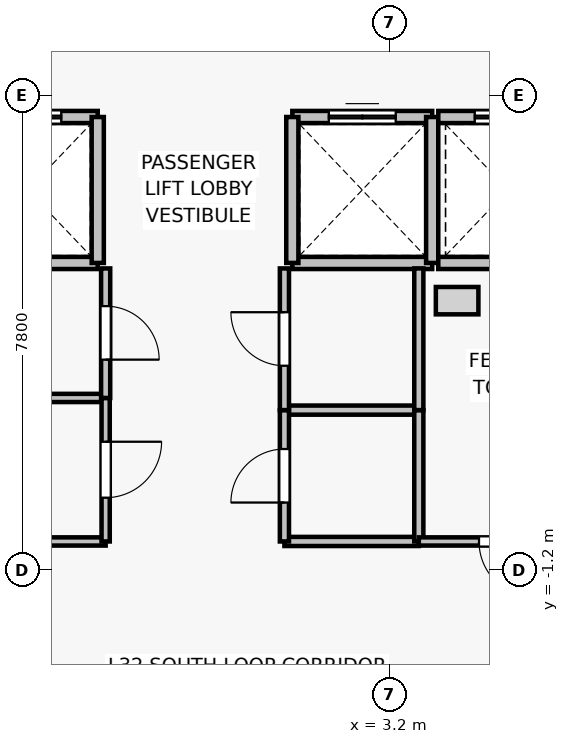
"""IFC4 building model, lengths in metres.
Left out: names, types, materials, properties, quantities, classifications, styles, units other than length and angle.
Written with IfcOpenShell. Run it as: python <this file> out.ifc"""

import sys

from ifc_helpers import new_model, si_unit, direction, frame, frame_2d, origin, place, context, subcontext, project, spatial, rectangle, extrude, source, transform, mapped, element, fill, save


model = new_model("IFC4")
c1 = context("Model", 3, precision=1e-05, world=origin(), true_north=direction((0.0, 1.0)))
c2 = subcontext(c1, "Body", "Model", "MODEL_VIEW")
j1 = project(units=[si_unit("LENGTHUNIT", "METRE"), si_unit("PLANEANGLEUNIT", "RADIAN")], contexts=[c1])
p1 = place(None, origin())
s1 = spatial("IfcSite", under=j1, at=p1, CompositionType="ELEMENT")
p2 = place(p1, origin())
s2 = spatial("IfcBuilding", under=s1, at=p2, CompositionType="ELEMENT")
p3 = place(p2, frame((0.0, 0.0, 116.5)))
s3 = spatial("IfcBuildingStorey", under=s2, at=p3, CompositionType="ELEMENT", Elevation=116.5)
p4 = place(p3, frame((-1.6, 3.85, 0.0), z_axis=(0.0, 0.0, 1.0), x_axis=(-1.0, 0.0, 0.0)))
e1 = element("IfcWall", 1, at=p4, inside=s3, PredefinedType="SOLIDWALL", context=c2, shape_type="SweptSolid", body=[
    extrude(rectangle(XDim=2.3, YDim=0.2, at=frame_2d((1.15, 0.0))), origin(), (0.0, 0.0, 1.0), 3.075),
])
p5 = place(p3, frame((-3.9, 6.25, 0.0), z_axis=(0.0, 0.0, 1.0), x_axis=(1.0, 0.0, 0.0)))
e2 = element("IfcWall", 2, at=p5, inside=s3, PredefinedType="SOLIDWALL", context=c2, shape_type="SweptSolid", body=[
    extrude(rectangle(XDim=2.3, YDim=0.2, at=frame_2d((1.15, 0.0))), origin(), (0.0, 0.0, 1.0), 3.075),
])
p6 = place(p5, frame((0.6, 0.0, 0.0)))
e3 = element("IfcOpeningElement", 3, at=p6, cuts=e2, PredefinedType="OPENING", context=c2, shape_type="SweptSolid", body=[
    extrude(rectangle(XDim=1.1, YDim=2.2, at=frame_2d((0.55, 1.1))), frame((0.0, 0.11, 0.0), z_axis=(0.0, -1.0, 0.0), x_axis=(1.0, 0.0, 0.0)), (0.0, 0.0, 1.0), 0.22),
])
p7 = place(p3, frame((-1.6, 6.25, 0.0), z_axis=(0.0, 0.0, 1.0), x_axis=(0.0, -1.0, 0.0)))
e4 = element("IfcWall", 4, at=p7, inside=s3, PredefinedType="SOLIDWALL", context=c2, shape_type="SweptSolid", body=[
    extrude(rectangle(XDim=2.4, YDim=0.2, at=frame_2d((1.2, 0.0))), origin(), (0.0, 0.0, 1.0), 3.075),
])
p8 = place(p3, frame((3.9, 3.85, 0.0), z_axis=(0.0, 0.0, 1.0), x_axis=(-1.0, 0.0, 0.0)))
e5 = element("IfcWall", 5, at=p8, inside=s3, PredefinedType="SOLIDWALL", context=c2, shape_type="SweptSolid", body=[
    extrude(rectangle(XDim=2.3, YDim=0.2, at=frame_2d((1.15, 0.0))), origin(), (0.0, 0.0, 1.0), 3.075),
])
p9 = place(p3, frame((1.6, 6.25, 0.0), z_axis=(0.0, 0.0, 1.0), x_axis=(1.0, 0.0, 0.0)))
e6 = element("IfcWall", 6, at=p9, inside=s3, PredefinedType="SOLIDWALL", context=c2, shape_type="SweptSolid", body=[
    extrude(rectangle(XDim=2.3, YDim=0.2, at=frame_2d((1.15, 0.0))), origin(), (0.0, 0.0, 1.0), 3.075),
])
p10 = place(p9, frame((0.6, 0.0, 0.0)))
e7 = element("IfcOpeningElement", 7, at=p10, cuts=e6, PredefinedType="OPENING", context=c2, shape_type="SweptSolid", body=[
    extrude(rectangle(XDim=1.1, YDim=2.2, at=frame_2d((0.55, 1.1))), frame((0.0, 0.11, 0.0), z_axis=(0.0, -1.0, 0.0), x_axis=(1.0, 0.0, 0.0)), (0.0, 0.0, 1.0), 0.22),
])
for number, where, z_axis, x_axis in (
    (8, (1.6, 3.85, 0.0), (0.0, 0.0, 1.0), (0.0, 1.0, 0.0)),
    (9, (3.9, 6.25, 0.0), (0.0, 0.0, 1.0), (0.0, -1.0, 0.0)),
):
    element("IfcWall", number, at=place(p3, frame(where, z_axis=z_axis, x_axis=x_axis)), inside=s3, PredefinedType="SOLIDWALL", context=c2, shape_type="SweptSolid", body=[
        extrude(rectangle(XDim=2.4, YDim=0.2, at=frame_2d((1.2, 0.0))), origin(), (0.0, 0.0, 1.0), 3.075),
    ])
p11 = place(p3, frame((6.3, 3.85, 0.0), z_axis=(0.0, 0.0, 1.0), x_axis=(-1.0, 0.0, 0.0)))
e10 = element("IfcWall", 10, at=p11, inside=s3, PredefinedType="SOLIDWALL", context=c2, shape_type="SweptSolid", body=[
    extrude(rectangle(XDim=2.3, YDim=0.2, at=frame_2d((1.15, 0.0))), origin(), (0.0, 0.0, 1.0), 3.075),
])
p12 = place(p3, frame((4.0, 6.25, 0.0), z_axis=(0.0, 0.0, 1.0), x_axis=(1.0, 0.0, 0.0)))
e11 = element("IfcWall", 11, at=p12, inside=s3, PredefinedType="SOLIDWALL", context=c2, shape_type="SweptSolid", body=[
    extrude(rectangle(XDim=2.3, YDim=0.2, at=frame_2d((1.15, 0.0))), origin(), (0.0, 0.0, 1.0), 3.075),
])
p13 = place(p12, frame((0.6, 0.0, 0.0)))
e12 = element("IfcOpeningElement", 12, at=p13, cuts=e11, PredefinedType="OPENING", context=c2, shape_type="SweptSolid", body=[
    extrude(rectangle(XDim=1.1, YDim=2.2, at=frame_2d((0.55, 1.1))), frame((0.0, 0.11, 0.0), z_axis=(0.0, -1.0, 0.0), x_axis=(1.0, 0.0, 0.0)), (0.0, 0.0, 1.0), 0.22),
])
for number, where, z_axis, x_axis in (
    (13, (-1.47, -0.73, 0.0), (0.0, 0.0, 1.0), (-1.0, 0.0, 0.0)),
    (14, (-3.47, 1.63, 0.0), (0.0, 0.0, 1.0), (1.0, 0.0, 0.0)),
):
    element("IfcWall", number, at=place(p3, frame(where, z_axis=z_axis, x_axis=x_axis)), inside=s3, PredefinedType="PARTITIONING", context=c2, shape_type="SweptSolid", body=[
        extrude(rectangle(XDim=2.0, YDim=0.135, at=frame_2d((1.0, 0.0))), origin(), (0.0, 0.0, 1.0), 3.075),
    ])
p14 = place(p3, frame((-1.47, 1.63, 0.0), z_axis=(0.0, 0.0, 1.0), x_axis=(0.0, -1.0, 0.0)))
e15 = element("IfcWall", 15, at=p14, inside=s3, PredefinedType="PARTITIONING", context=c2, shape_type="SweptSolid", body=[
    extrude(rectangle(XDim=2.36, YDim=0.135, at=frame_2d((1.18, 0.0))), origin(), (0.0, 0.0, 1.0), 3.075),
])
p15 = place(p14, frame((0.72, 0.0, 0.0)))
e16 = element("IfcOpeningElement", 16, at=p15, cuts=e15, PredefinedType="OPENING", context=c2, shape_type="SweptSolid", body=[
    extrude(rectangle(XDim=0.92, YDim=2.1, at=frame_2d((0.46, 1.05))), frame((0.0, 0.077, 0.0), z_axis=(0.0, -1.0, 0.0), x_axis=(1.0, 0.0, 0.0)), (0.0, 0.0, 1.0), 0.155),
])
p16 = place(p3, frame((-1.47, 3.76, 0.0), z_axis=(0.0, 0.0, 1.0), x_axis=(0.0, -1.0, 0.0)))
e17 = element("IfcWall", 17, at=p16, inside=s3, PredefinedType="PARTITIONING", context=c2, shape_type="SweptSolid", body=[
    extrude(rectangle(XDim=2.13, YDim=0.15, at=frame_2d((1.065, 0.0))), origin(), (0.0, 0.0, 1.0), 3.075),
])
p17 = place(p16, frame((0.62, 0.0, 0.0)))
e18 = element("IfcOpeningElement", 18, at=p17, cuts=e17, PredefinedType="OPENING", context=c2, shape_type="SweptSolid", body=[
    extrude(rectangle(XDim=0.88, YDim=2.1, at=frame_2d((0.44, 1.05))), frame((0.0, 0.085, 0.0), z_axis=(0.0, -1.0, 0.0), x_axis=(1.0, 0.0, 0.0)), (0.0, 0.0, 1.0), 0.17),
])
for number, where, z_axis, x_axis in (
    (19, (3.68, -0.73, 0.0), (0.0, 0.0, 1.0), (-1.0, 0.0, 0.0)),
    (20, (1.47, 1.43, 0.0), (0.0, 0.0, 1.0), (1.0, 0.0, 0.0)),
):
    element("IfcWall", number, at=place(p3, frame(where, z_axis=z_axis, x_axis=x_axis)), inside=s3, PredefinedType="PARTITIONING", context=c2, shape_type="SweptSolid", body=[
        extrude(rectangle(XDim=2.21, YDim=0.15, at=frame_2d((1.105, 0.0))), origin(), (0.0, 0.0, 1.0), 3.075),
    ])
p18 = place(p3, frame((1.47, -0.73, 0.0), z_axis=(0.0, 0.0, 1.0), x_axis=(0.0, 1.0, 0.0)))
e21 = element("IfcWall", 21, at=p18, inside=s3, PredefinedType="PARTITIONING", context=c2, shape_type="SweptSolid", body=[
    extrude(rectangle(XDim=2.16, YDim=0.15, at=frame_2d((1.08, 0.0))), origin(), (0.0, 0.0, 1.0), 3.075),
])
p19 = place(p18, frame((0.64, 0.0, 0.0)))
e22 = element("IfcOpeningElement", 22, at=p19, cuts=e21, PredefinedType="OPENING", context=c2, shape_type="SweptSolid", body=[
    extrude(rectangle(XDim=0.88, YDim=2.1, at=frame_2d((0.44, 1.05))), frame((0.0, 0.085, 0.0), z_axis=(0.0, -1.0, 0.0), x_axis=(1.0, 0.0, 0.0)), (0.0, 0.0, 1.0), 0.17),
])
p20 = place(p3, frame((3.68, 1.43, 0.0), z_axis=(0.0, 0.0, 1.0), x_axis=(0.0, -1.0, 0.0)))
e23 = element("IfcWall", 23, at=p20, inside=s3, PredefinedType="PARTITIONING", context=c2, shape_type="SweptSolid", body=[
    extrude(rectangle(XDim=2.16, YDim=0.15, at=frame_2d((1.08, 0.0))), origin(), (0.0, 0.0, 1.0), 3.075),
])
p21 = place(p3, frame((1.47, 1.43, 0.0), z_axis=(0.0, 0.0, 1.0), x_axis=(0.0, 1.0, 0.0)))
e24 = element("IfcWall", 24, at=p21, inside=s3, PredefinedType="PARTITIONING", context=c2, shape_type="SweptSolid", body=[
    extrude(rectangle(XDim=2.33, YDim=0.15, at=frame_2d((1.165, 0.0))), origin(), (0.0, 0.0, 1.0), 3.075),
])
p22 = place(p21, frame((0.73, 0.0, 0.0)))
e25 = element("IfcOpeningElement", 25, at=p22, cuts=e24, PredefinedType="OPENING", context=c2, shape_type="SweptSolid", body=[
    extrude(rectangle(XDim=0.88, YDim=2.15, at=frame_2d((0.44, 1.075))), frame((0.0, 0.085, 0.0), z_axis=(0.0, -1.0, 0.0), x_axis=(1.0, 0.0, 0.0)), (0.0, 0.0, 1.0), 0.17),
])
p23 = place(p3, frame((3.68, 3.76, 0.0), z_axis=(0.0, 0.0, 1.0), x_axis=(0.0, -1.0, 0.0)))
e26 = element("IfcWall", 26, at=p23, inside=s3, PredefinedType="PARTITIONING", context=c2, shape_type="SweptSolid", body=[
    extrude(rectangle(XDim=2.33, YDim=0.15, at=frame_2d((1.165, 0.0))), origin(), (0.0, 0.0, 1.0), 3.075),
])
p24 = place(p3, frame((6.58, -0.73, 0.0), z_axis=(0.0, 0.0, 1.0), x_axis=(-1.0, 0.0, 0.0)))
e27 = element("IfcWall", 27, at=p24, inside=s3, PredefinedType="PARTITIONING", context=c2, shape_type="SweptSolid", body=[
    extrude(rectangle(XDim=2.9, YDim=0.135, at=frame_2d((1.45, 0.0))), origin(), (0.0, 0.0, 1.0), 3.075),
])
p25 = place(p24, frame((0.99, 0.0, 0.0)))
e28 = element("IfcOpeningElement", 28, at=p25, cuts=e27, PredefinedType="OPENING", context=c2, shape_type="SweptSolid", body=[
    extrude(rectangle(XDim=0.92, YDim=2.1, at=frame_2d((0.46, 1.05))), frame((0.0, 0.077, 0.0), z_axis=(0.0, -1.0, 0.0), x_axis=(1.0, 0.0, 0.0)), (0.0, 0.0, 1.0), 0.155),
])
m1 = source(origin(), c2, "Body", "SweptSolid", [
    extrude(rectangle(XDim=1.1, YDim=2.2, at=frame_2d((0.55, 1.1))), frame((0.0, 0.025, 0.0), z_axis=(0.0, -1.0, 0.0), x_axis=(1.0, 0.0, 0.0)), (0.0, 0.0, 1.0), 0.05),
])
p26 = place(p6, origin())
e29 = element("IfcDoor", 29, at=p26, inside=s3, OperationType="DOUBLE_DOOR_SLIDING", PredefinedType="DOOR", context=c2, shape_type="MappedRepresentation", body=[
    mapped(m1, transform((0.0, 0.0, 0.0), x_axis=(1.0, 0.0, 0.0), y_axis=(0.0, 1.0, 0.0), z_axis=(0.0, 0.0, 1.0), scale=1.0)),
])
fill(e3, e29)
p27 = place(p10, origin())
e30 = element("IfcDoor", 30, at=p27, inside=s3, OperationType="DOUBLE_DOOR_SLIDING", PredefinedType="DOOR", context=c2, shape_type="MappedRepresentation", body=[
    mapped(m1, transform((0.0, 0.0, 0.0), x_axis=(1.0, 0.0, 0.0), y_axis=(0.0, 1.0, 0.0), z_axis=(0.0, 0.0, 1.0), scale=1.0)),
])
fill(e7, e30)
p28 = place(p13, origin())
e31 = element("IfcDoor", 31, at=p28, inside=s3, OperationType="DOUBLE_DOOR_SLIDING", PredefinedType="DOOR", context=c2, shape_type="MappedRepresentation", body=[
    mapped(m1, transform((0.0, 0.0, 0.0), x_axis=(1.0, 0.0, 0.0), y_axis=(0.0, 1.0, 0.0), z_axis=(0.0, 0.0, 1.0), scale=1.0)),
])
fill(e12, e31)
m2 = source(origin(), c2, "Body", "SweptSolid", [
    extrude(rectangle(XDim=0.92, YDim=2.1, at=frame_2d((0.46, 1.05))), frame((0.0, 0.025, 0.0), z_axis=(0.0, -1.0, 0.0), x_axis=(1.0, 0.0, 0.0)), (0.0, 0.0, 1.0), 0.05),
])
p29 = place(p15, origin())
e32 = element("IfcDoor", 32, at=p29, inside=s3, OperationType="SINGLE_SWING_LEFT", PredefinedType="DOOR", context=c2, shape_type="MappedRepresentation", body=[
    mapped(m2, transform((0.0, 0.0, 0.0), x_axis=(1.0, 0.0, 0.0), y_axis=(0.0, 1.0, 0.0), z_axis=(0.0, 0.0, 1.0), scale=1.0)),
])
fill(e16, e32)
m3 = source(origin(), c2, "Body", "SweptSolid", [
    extrude(rectangle(XDim=0.88, YDim=2.1, at=frame_2d((0.44, 1.05))), frame((0.0, 0.025, 0.0), z_axis=(0.0, -1.0, 0.0), x_axis=(1.0, 0.0, 0.0)), (0.0, 0.0, 1.0), 0.05),
])
p30 = place(p17, origin())
e33 = element("IfcDoor", 33, at=p30, inside=s3, OperationType="SINGLE_SWING_RIGHT", PredefinedType="DOOR", context=c2, shape_type="MappedRepresentation", body=[
    mapped(m3, transform((0.0, 0.0, 0.0), x_axis=(1.0, 0.0, 0.0), y_axis=(0.0, 1.0, 0.0), z_axis=(0.0, 0.0, 1.0), scale=1.0)),
])
fill(e18, e33)
p31 = place(p19, origin())
e34 = element("IfcDoor", 34, at=p31, inside=s3, OperationType="SINGLE_SWING_LEFT", PredefinedType="DOOR", context=c2, shape_type="MappedRepresentation", body=[
    mapped(m3, transform((0.0, 0.0, 0.0), x_axis=(1.0, 0.0, 0.0), y_axis=(0.0, 1.0, 0.0), z_axis=(0.0, 0.0, 1.0), scale=1.0)),
])
fill(e22, e34)
m4 = source(origin(), c2, "Body", "SweptSolid", [
    extrude(rectangle(XDim=0.88, YDim=2.15, at=frame_2d((0.44, 1.075))), frame((0.0, 0.025, 0.0), z_axis=(0.0, -1.0, 0.0), x_axis=(1.0, 0.0, 0.0)), (0.0, 0.0, 1.0), 0.05),
])
p32 = place(p22, origin())
e35 = element("IfcDoor", 35, at=p32, inside=s3, OperationType="SINGLE_SWING_RIGHT", PredefinedType="DOOR", context=c2, shape_type="MappedRepresentation", body=[
    mapped(m4, transform((0.0, 0.0, 0.0), x_axis=(1.0, 0.0, 0.0), y_axis=(0.0, 1.0, 0.0), z_axis=(0.0, 0.0, 1.0), scale=1.0)),
])
fill(e25, e35)
p33 = place(p25, origin())
e36 = element("IfcDoor", 36, at=p33, inside=s3, OperationType="SINGLE_SWING_LEFT", PredefinedType="DOOR", context=c2, shape_type="MappedRepresentation", body=[
    mapped(m2, transform((0.0, 0.0, 0.0), x_axis=(1.0, 0.0, 0.0), y_axis=(0.0, 1.0, 0.0), z_axis=(0.0, 0.0, 1.0), scale=1.0)),
])
fill(e28, e36)
save(model, sys.argv[1])
